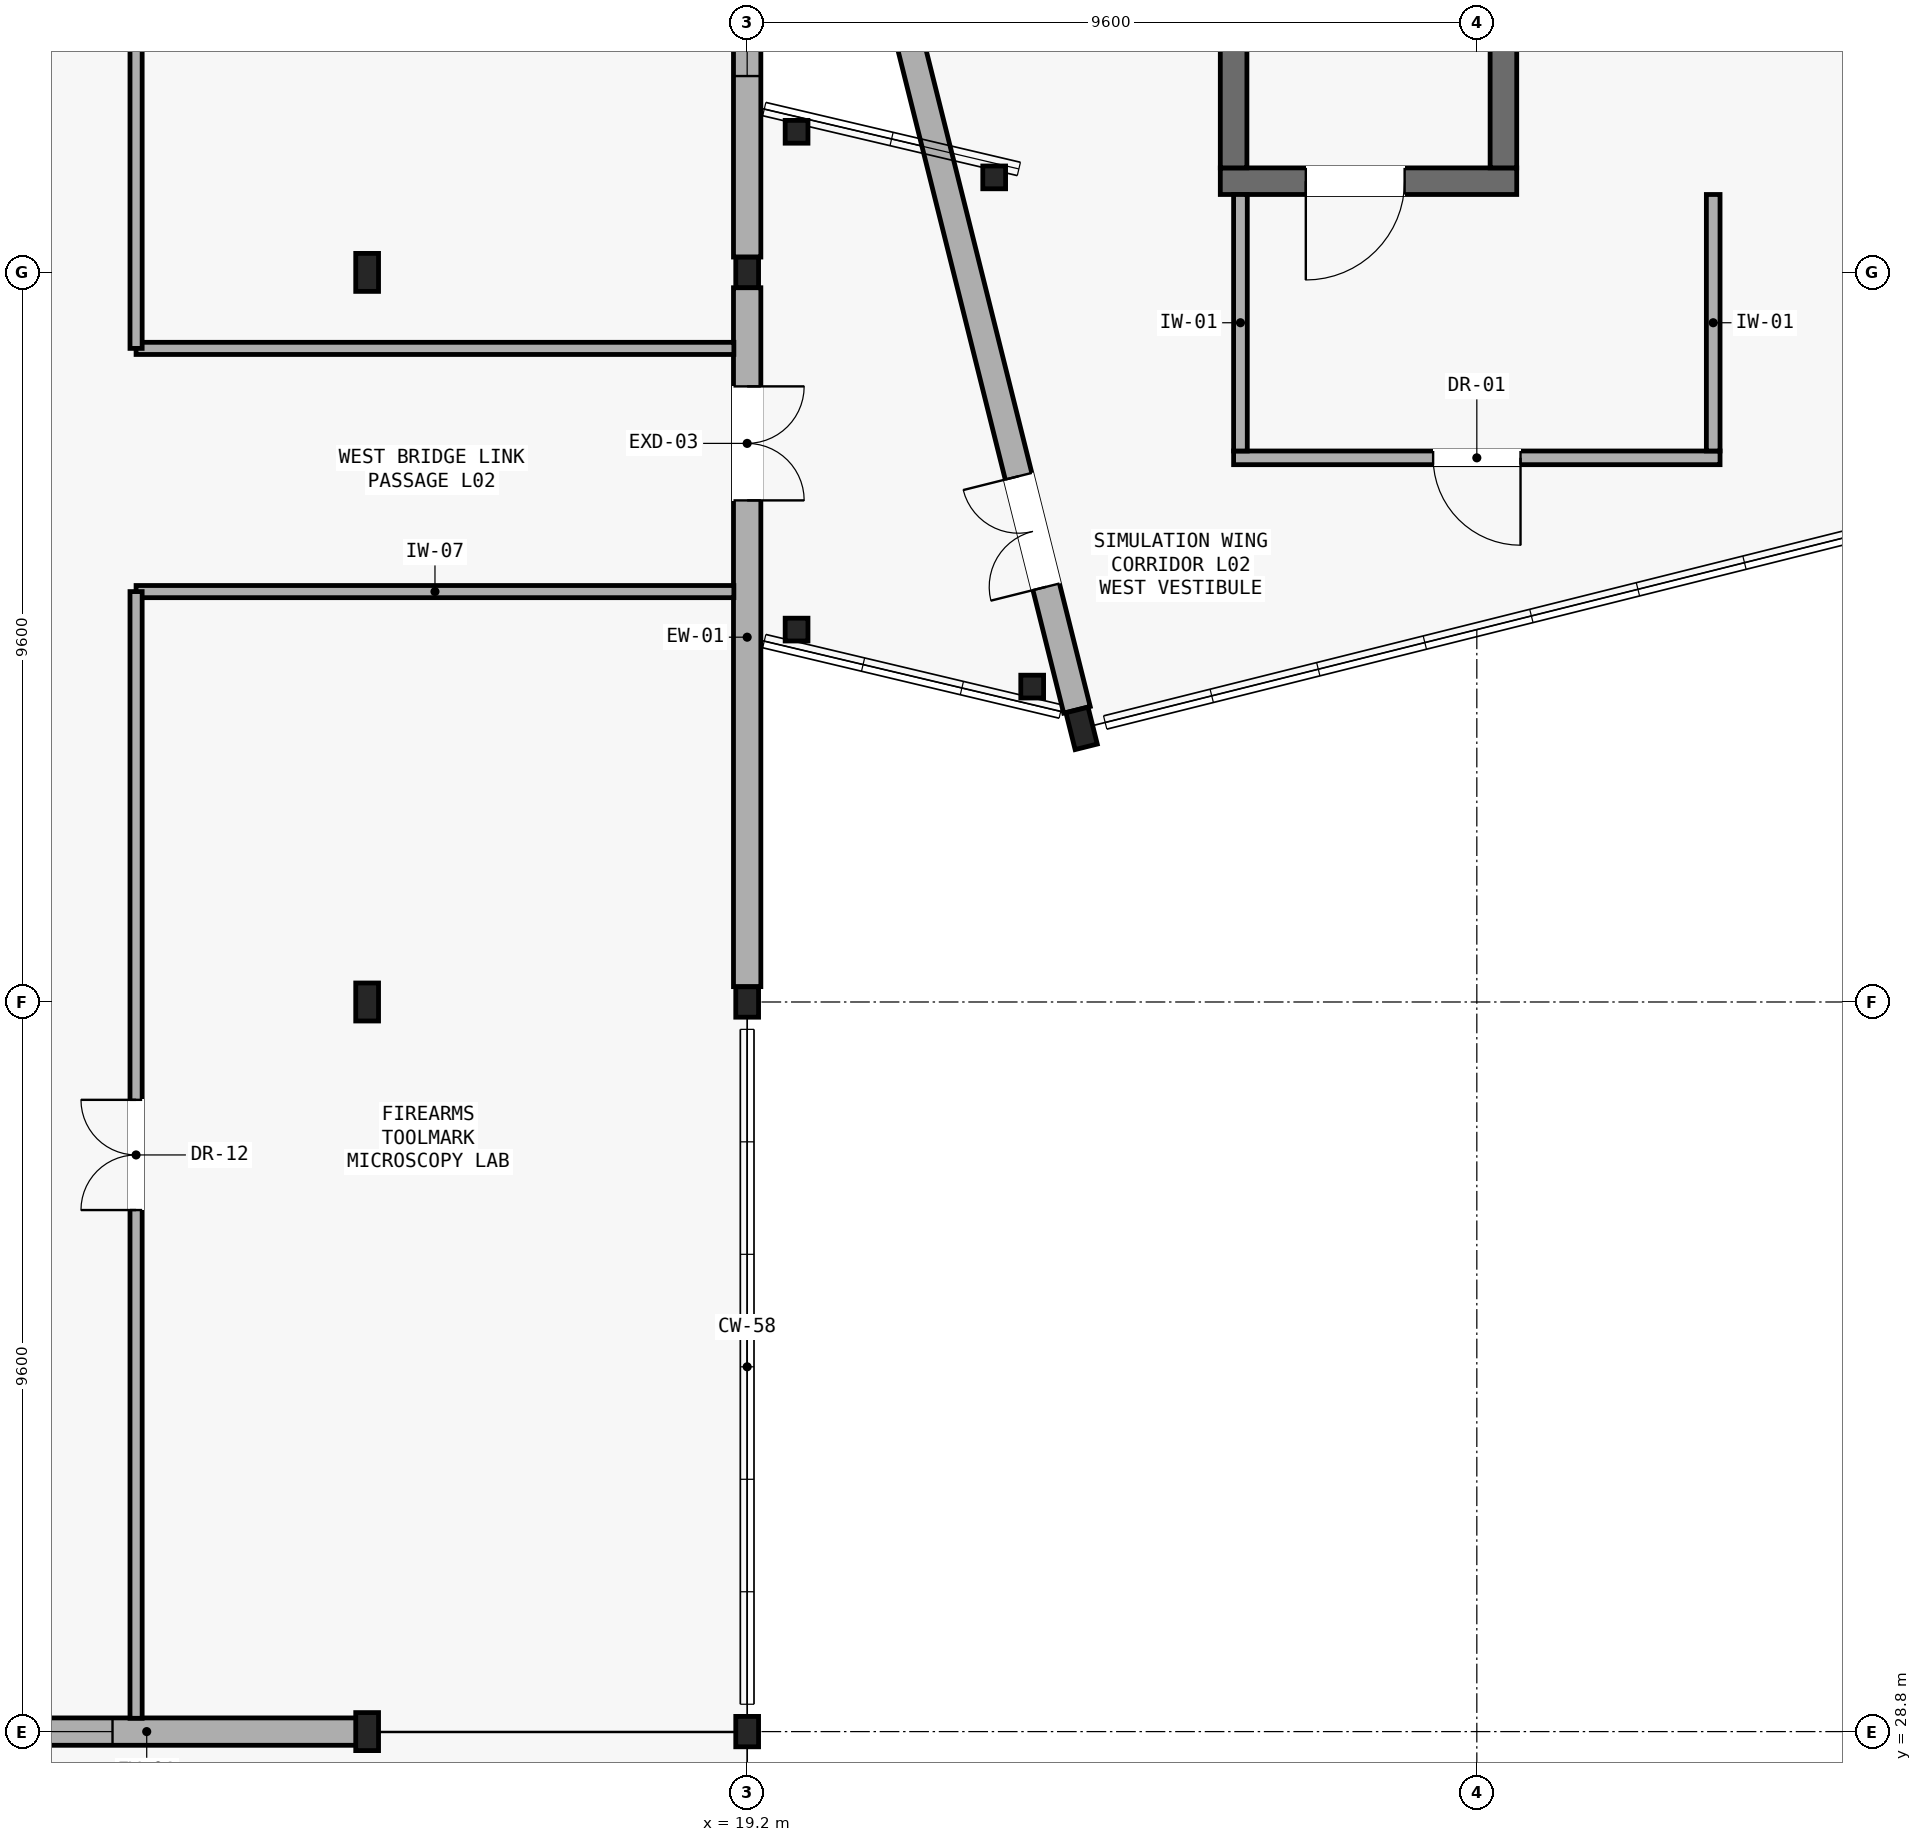
"""IFC4 building model, lengths in metres.
Left out: names, types, materials, properties, quantities, classifications, styles, units other than length and angle.
Written with IfcOpenShell. Run it as: python <this file> out.ifc"""

import sys

from ifc_helpers import new_model, si_unit, direction, frame, frame_2d, origin, origin_2d, place, context, subcontext, project, spatial, rectangle, i_section, extrude, element, fill, save


model = new_model("IFC4")
c1 = context("Model", 3, precision=1e-05, world=origin(), true_north=direction((0.0, 1.0)))
c2 = subcontext(c1, "Body", "Model", "MODEL_VIEW")
j1 = project(units=[si_unit("LENGTHUNIT", "METRE"), si_unit("PLANEANGLEUNIT", "RADIAN")], contexts=[c1])
p1 = place(None, origin())
s1 = spatial("IfcSite", under=j1, at=p1, CompositionType="ELEMENT")
p2 = place(p1, origin())
s2 = spatial("IfcBuilding", under=s1, at=p2, CompositionType="ELEMENT")
p3 = place(p2, frame((0.0, 0.0, 9.45)))
s3 = spatial("IfcBuildingStorey", under=s2, at=p3, CompositionType="ELEMENT", Elevation=9.45)
for number, where, z_axis, x_axis in (
    (1, (19.85, 49.85, 0.0), (0.0, 0.0, 1.0), (1.0, 0.0, 0.0)),
    (2, (19.85, 43.3, 0.0), (0.0, 0.0, 1.0), (1.0, 0.0, 0.0)),
    (3, (22.45, 49.25, 0.0), (0.0, 0.0, 1.0), (1.0, 0.0, 0.0)),
    (4, (22.95, 42.55, 0.0), (0.0, 0.0, 1.0), (1.0, 0.0, 0.0)),
):
    element("IfcColumn", number, at=place(p3, frame(where, z_axis=z_axis, x_axis=x_axis)), inside=s3, PredefinedType="COLUMN", context=c2, shape_type="SweptSolid", body=[
        extrude(i_section(OverallWidth=0.3, OverallDepth=0.3, WebThickness=0.011, FlangeThickness=0.019, FilletRadius=0.027, at=origin_2d()), origin(), (0.0, 0.0, 1.0), 4.2),
    ])
p4 = place(p3, frame((19.2, 28.8, 0.0), z_axis=(0.0, 0.0, 1.0), x_axis=(1.0, 0.0, 0.0)))
e5 = element("IfcColumn", 5, at=p4, inside=s3, PredefinedType="COLUMN", context=c2, shape_type="SweptSolid", body=[
    extrude(i_section(OverallWidth=0.3, OverallDepth=0.4, WebThickness=0.013, FlangeThickness=0.024, FilletRadius=0.027, at=origin_2d()), origin(), (0.0, 0.0, 1.0), 4.2),
])
p5 = place(p3, frame((14.2, 28.8, 0.0), z_axis=(0.0, 0.0, 1.0), x_axis=(1.0, 0.0, 0.0)))
e6 = element("IfcColumn", 6, at=p5, inside=s3, PredefinedType="COLUMN", context=c2, shape_type="SweptSolid", body=[
    extrude(i_section(OverallWidth=0.3, OverallDepth=0.5, WebThickness=0.014, FlangeThickness=0.028, FilletRadius=0.027, at=origin_2d()), origin(), (0.0, 0.0, 1.0), 4.2),
])
p6 = place(p3, frame((19.2, 38.4, 0.0), z_axis=(0.0, 0.0, 1.0), x_axis=(1.0, 0.0, 0.0)))
e7 = element("IfcColumn", 7, at=p6, inside=s3, PredefinedType="COLUMN", context=c2, shape_type="SweptSolid", body=[
    extrude(i_section(OverallWidth=0.3, OverallDepth=0.4, WebThickness=0.013, FlangeThickness=0.024, FilletRadius=0.027, at=origin_2d()), origin(), (0.0, 0.0, 1.0), 4.2),
])
p7 = place(p3, frame((14.2, 38.4, 0.0), z_axis=(0.0, 0.0, 1.0), x_axis=(1.0, 0.0, 0.0)))
e8 = element("IfcColumn", 8, at=p7, inside=s3, PredefinedType="COLUMN", context=c2, shape_type="SweptSolid", body=[
    extrude(i_section(OverallWidth=0.3, OverallDepth=0.5, WebThickness=0.014, FlangeThickness=0.028, FilletRadius=0.027, at=origin_2d()), origin(), (0.0, 0.0, 1.0), 4.2),
])
p8 = place(p3, frame((19.2, 48.0, 0.0), z_axis=(0.0, 0.0, 1.0), x_axis=(1.0, 0.0, 0.0)))
e9 = element("IfcColumn", 9, at=p8, inside=s3, PredefinedType="COLUMN", context=c2, shape_type="SweptSolid", body=[
    extrude(i_section(OverallWidth=0.3, OverallDepth=0.4, WebThickness=0.013, FlangeThickness=0.024, FilletRadius=0.027, at=origin_2d()), origin(), (0.0, 0.0, 1.0), 4.2),
])
for number, where, z_axis, x_axis in (
    (10, (14.2, 48.0, 0.0), (0.0, 0.0, 1.0), (1.0, 0.0, 0.0)),
    (11, (23.6, 42.0, 0.0), (0.0, 0.0, 1.0), (0.97, 0.243, 0.0)),
):
    element("IfcColumn", number, at=place(p3, frame(where, z_axis=z_axis, x_axis=x_axis)), inside=s3, PredefinedType="COLUMN", context=c2, shape_type="SweptSolid", body=[
        extrude(i_section(OverallWidth=0.3, OverallDepth=0.5, WebThickness=0.014, FlangeThickness=0.028, FilletRadius=0.027, at=origin_2d()), origin(), (0.0, 0.0, 1.0), 4.2),
    ])
p9 = place(p3, frame((19.2, 38.602, 0.0), z_axis=(0.0, 0.0, 1.0), x_axis=(0.0, 1.0, 0.0)))
e12 = element("IfcWall", 12, at=p9, inside=s3, PredefinedType="SOLIDWALL", context=c2, shape_type="SweptSolid", body=[
    extrude(rectangle(XDim=9.196, YDim=0.36, at=frame_2d((4.598, 0.0))), origin(), (0.0, 0.0, 1.0), 3.51),
])
p10 = place(p9, frame((6.398, 0.0, 0.0)))
e13 = element("IfcOpeningElement", 13, at=p10, cuts=e12, PredefinedType="OPENING", context=c2, shape_type="SweptSolid", body=[
    extrude(rectangle(XDim=1.5, YDim=2.2, at=frame_2d((0.75, 1.1))), frame((0.0, 0.19, 0.0), z_axis=(0.0, -1.0, 0.0), x_axis=(1.0, 0.0, 0.0)), (0.0, 0.0, 1.0), 0.38),
])
p11 = place(p3, frame((19.2, 48.202, 0.0), z_axis=(0.0, 0.0, 1.0), x_axis=(0.0, 1.0, 0.0)))
e14 = element("IfcWall", 14, at=p11, inside=s3, PredefinedType="SOLIDWALL", context=c2, shape_type="SweptSolid", body=[
    extrude(rectangle(XDim=9.196, YDim=0.36, at=frame_2d((4.598, 0.0))), origin(), (0.0, 0.0, 1.0), 3.51),
])
p12 = place(p11, frame((2.381, 0.0, 0.9)))
e15 = element("IfcOpeningElement", 15, at=p12, cuts=e14, PredefinedType="OPENING", context=c2, shape_type="SweptSolid", body=[
    extrude(rectangle(XDim=1.5, YDim=1.55, at=frame_2d((0.75, 0.775))), frame((0.0, 0.19, 0.0), z_axis=(0.0, -1.0, 0.0), x_axis=(1.0, 0.0, 0.0)), (0.0, 0.0, 1.0), 0.38),
])
p13 = place(p11, frame((5.315, 0.0, 0.9)))
e16 = element("IfcOpeningElement", 16, at=p13, cuts=e14, PredefinedType="OPENING", context=c2, shape_type="SweptSolid", body=[
    extrude(rectangle(XDim=1.5, YDim=1.55, at=frame_2d((0.75, 0.775))), frame((0.0, 0.19, 0.0), z_axis=(0.0, -1.0, 0.0), x_axis=(1.0, 0.0, 0.0)), (0.0, 0.0, 1.0), 0.38),
])
p14 = place(p3, frame((8.409, 28.8, 0.0), z_axis=(0.0, 0.0, 1.0), x_axis=(1.0, 0.0, 0.0)))
e17 = element("IfcWall", 17, at=p14, inside=s3, PredefinedType="SOLIDWALL", context=c2, shape_type="SweptSolid", body=[
    extrude(rectangle(XDim=5.781, YDim=0.36, at=frame_2d((2.891, 0.0))), origin(), (0.0, 0.0, 1.0), 3.64),
])
p15 = place(p14, frame((1.241, 0.0, 0.9)))
e18 = element("IfcOpeningElement", 18, at=p15, cuts=e17, PredefinedType="OPENING", context=c2, shape_type="SweptSolid", body=[
    extrude(rectangle(XDim=1.2, YDim=1.15, at=frame_2d((0.6, 0.575))), frame((0.0, 0.19, 0.0), z_axis=(0.0, -1.0, 0.0), x_axis=(1.0, 0.0, 0.0)), (0.0, 0.0, 1.0), 0.38),
])
p16 = place(p3, frame((23.539, 42.244, 0.0), z_axis=(0.0, 0.0, 1.0), x_axis=(-0.242523223331, 0.970145600487, 0.0)))
e19 = element("IfcWall", 19, at=p16, inside=s3, PredefinedType="SOLIDWALL", context=c2, shape_type="SweptSolid", body=[
    extrude(rectangle(XDim=13.896, YDim=0.36, at=frame_2d((6.948, 0.0))), origin(), (0.0, 0.0, 1.0), 3.41),
])
p17 = place(p16, frame((1.668, 0.0, 0.0)))
e20 = element("IfcOpeningElement", 20, at=p17, cuts=e19, PredefinedType="OPENING", context=c2, shape_type="SweptSolid", body=[
    extrude(rectangle(XDim=1.5, YDim=2.2, at=frame_2d((0.75, 1.1))), frame((0.0, 0.19, 0.0), z_axis=(0.0, -1.0, 0.0), x_axis=(1.0, 0.0, 0.0)), (0.0, 0.0, 1.0), 0.38),
])
p18 = place(p3, frame((25.425, 49.2, 0.0), z_axis=(0.0, 0.0, 1.0), x_axis=(1.0, 0.0, 0.0)))
e21 = element("IfcWall", 21, at=p18, inside=s3, PredefinedType="SHEAR", context=c2, shape_type="SweptSolid", body=[
    extrude(rectangle(XDim=3.9, YDim=0.35, at=frame_2d((1.95, 0.0))), origin(), (0.0, 0.0, 1.0), 3.97),
])
p19 = place(p18, frame((1.125, 0.0, 0.0)))
e22 = element("IfcOpeningElement", 22, at=p19, cuts=e21, PredefinedType="OPENING", context=c2, shape_type="SweptSolid", body=[
    extrude(rectangle(XDim=1.3, YDim=2.15, at=frame_2d((0.65, 1.075))), frame((0.0, 0.185, 0.0), z_axis=(0.0, -1.0, 0.0), x_axis=(1.0, 0.0, 0.0)), (0.0, 0.0, 1.0), 0.37),
])
for number, where, z_axis, x_axis in (
    (23, (25.6, 49.375, 0.0), (0.0, 0.0, 1.0), (0.0, 1.0, 0.0)),
    (24, (29.15, 49.375, 0.0), (0.0, 0.0, 1.0), (0.0, 1.0, 0.0)),
):
    element("IfcWall", number, at=place(p3, frame(where, z_axis=z_axis, x_axis=x_axis)), inside=s3, PredefinedType="SHEAR", context=c2, shape_type="SweptSolid", body=[
        extrude(rectangle(XDim=7.6, YDim=0.35, at=frame_2d((3.8, 0.0))), origin(), (0.0, 0.0, 1.0), 3.97),
    ])
p20 = place(p3, frame((25.6, 45.56, 0.0), z_axis=(0.0, 0.0, 1.0), x_axis=(1.0, 0.0, 0.0)))
e25 = element("IfcWall", 25, at=p20, inside=s3, PredefinedType="PARTITIONING", context=c2, shape_type="SweptSolid", body=[
    extrude(rectangle(XDim=6.4, YDim=0.18, at=frame_2d((3.2, 0.0))), origin(), (0.0, 0.0, 1.0), 3.59),
])
p21 = place(p20, frame((2.625, 0.0, 0.0)))
e26 = element("IfcOpeningElement", 26, at=p21, cuts=e25, PredefinedType="OPENING", context=c2, shape_type="SweptSolid", body=[
    extrude(rectangle(XDim=1.15, YDim=2.15, at=frame_2d((0.575, 1.075))), frame((0.0, 0.1, 0.0), z_axis=(0.0, -1.0, 0.0), x_axis=(1.0, 0.0, 0.0)), (0.0, 0.0, 1.0), 0.2),
])
for number, where, z_axis, x_axis in (
    (27, (25.69, 45.65, 0.0), (0.0, 0.0, 1.0), (0.0, 1.0, 0.0)),
    (28, (31.91, 45.65, 0.0), (0.0, 0.0, 1.0), (0.0, 1.0, 0.0)),
):
    element("IfcWall", number, at=place(p3, frame(where, z_axis=z_axis, x_axis=x_axis)), inside=s3, PredefinedType="PARTITIONING", context=c2, shape_type="SweptSolid", body=[
        extrude(rectangle(XDim=3.375, YDim=0.18, at=frame_2d((1.688, 0.0))), origin(), (0.0, 0.0, 1.0), 3.97),
    ])
p22 = place(p3, frame((19.025, 43.8, 0.0), z_axis=(0.0, 0.0, 1.0), x_axis=(-1.0, 0.0, 0.0)))
e29 = element("IfcWall", 29, at=p22, inside=s3, PredefinedType="PARTITIONING", context=c2, shape_type="SweptSolid", body=[
    extrude(rectangle(XDim=7.865, YDim=0.16, at=frame_2d((3.933, 0.0))), origin(), (0.0, 0.0, 1.0), 3.97),
])
p23 = place(p3, frame((11.16, 43.8, 0.0), z_axis=(0.0, 0.0, 1.0), x_axis=(0.0, -1.0, 0.0)))
e30 = element("IfcWall", 30, at=p23, inside=s3, PredefinedType="PARTITIONING", context=c2, shape_type="SweptSolid", body=[
    extrude(rectangle(XDim=14.825, YDim=0.16, at=frame_2d((7.413, 0.0))), origin(), (0.0, 0.0, 1.0), 3.59),
])
p24 = place(p23, frame((6.688, 0.0, 0.0)))
e31 = element("IfcOpeningElement", 31, at=p24, cuts=e30, PredefinedType="OPENING", context=c2, shape_type="SweptSolid", body=[
    extrude(rectangle(XDim=1.45, YDim=2.15, at=frame_2d((0.725, 1.075))), frame((0.0, 0.09, 0.0), z_axis=(0.0, -1.0, 0.0), x_axis=(1.0, 0.0, 0.0)), (0.0, 0.0, 1.0), 0.18),
])
p25 = place(p3, frame((11.16, 47.0, 0.0), z_axis=(0.0, 0.0, 1.0), x_axis=(1.0, 0.0, 0.0)))
e32 = element("IfcWall", 32, at=p25, inside=s3, PredefinedType="PARTITIONING", context=c2, shape_type="SweptSolid", body=[
    extrude(rectangle(XDim=7.865, YDim=0.16, at=frame_2d((3.933, 0.0))), origin(), (0.0, 0.0, 1.0), 3.97),
])
p26 = place(p3, frame((11.16, 82.6, 0.0), z_axis=(0.0, 0.0, 1.0), x_axis=(0.0, -1.0, 0.0)))
e33 = element("IfcWall", 33, at=p26, inside=s3, PredefinedType="PARTITIONING", context=c2, shape_type="SweptSolid", body=[
    extrude(rectangle(XDim=35.6, YDim=0.16, at=frame_2d((17.8, 0.0))), origin(), (0.0, 0.0, 1.0), 3.59),
])
p27 = place(p26, frame((17.075, 0.0, 0.0)))
e34 = element("IfcOpeningElement", 34, at=p27, cuts=e33, PredefinedType="OPENING", context=c2, shape_type="SweptSolid", body=[
    extrude(rectangle(XDim=1.45, YDim=2.15, at=frame_2d((0.725, 1.075))), frame((0.0, 0.09, 0.0), z_axis=(0.0, -1.0, 0.0), x_axis=(1.0, 0.0, 0.0)), (0.0, 0.0, 1.0), 0.18),
])
p28 = place(p3, frame((32.74, 59.041, 0.0), z_axis=(0.0, 0.0, 1.0), x_axis=(0.242525471141, -0.970145038563, 0.0)))
e35 = element("IfcWall", 35, at=p28, inside=s3, PredefinedType="PARTITIONING", context=c2, shape_type="SweptSolid", body=[
    extrude(rectangle(XDim=11.315, YDim=0.12, at=frame_2d((5.657, 0.0))), origin(), (0.0, 0.0, 1.0), 3.97),
])
p29 = place(p10, frame((1.5, 0.0, 0.0), z_axis=(0.0, 0.0, 1.0), x_axis=(-1.0, 0.0, 0.0)))
e36 = element("IfcDoor", 36, at=p29, inside=s3, OperationType="SINGLE_SWING_LEFT", PredefinedType="DOOR", context=c2, shape_type="SweptSolid", body=[
    extrude(rectangle(XDim=1.5, YDim=2.2, at=frame_2d((0.75, 1.1))), frame((0.0, 0.025, 0.0), z_axis=(0.0, -1.0, 0.0), x_axis=(1.0, 0.0, 0.0)), (0.0, 0.0, 1.0), 0.05),
])
fill(e13, e36)
p30 = place(p12, origin())
e37 = element("IfcWindow", 37, at=p30, inside=s3, PartitioningType="SINGLE_PANEL", PredefinedType="WINDOW", context=c2, shape_type="SweptSolid", body=[
    extrude(rectangle(XDim=1.5, YDim=1.55, at=frame_2d((0.75, 0.775))), frame((0.0, 0.03, 0.0), z_axis=(0.0, -1.0, 0.0), x_axis=(1.0, 0.0, 0.0)), (0.0, 0.0, 1.0), 0.06),
])
fill(e15, e37)
p31 = place(p15, origin())
e38 = element("IfcWindow", 38, at=p31, inside=s3, PartitioningType="SINGLE_PANEL", PredefinedType="WINDOW", context=c2, shape_type="SweptSolid", body=[
    extrude(rectangle(XDim=1.2, YDim=1.15, at=frame_2d((0.6, 0.575))), frame((0.0, 0.03, 0.0), z_axis=(0.0, -1.0, 0.0), x_axis=(1.0, 0.0, 0.0)), (0.0, 0.0, 1.0), 0.06),
])
fill(e18, e38)
p32 = place(p17, origin())
e39 = element("IfcDoor", 39, at=p32, inside=s3, OperationType="SINGLE_SWING_LEFT", PredefinedType="DOOR", context=c2, shape_type="SweptSolid", body=[
    extrude(rectangle(XDim=1.5, YDim=2.2, at=frame_2d((0.75, 1.1))), frame((0.0, 0.025, 0.0), z_axis=(0.0, -1.0, 0.0), x_axis=(1.0, 0.0, 0.0)), (0.0, 0.0, 1.0), 0.05),
])
fill(e20, e39)
p33 = place(p19, frame((1.3, 0.0, 0.0), z_axis=(0.0, 0.0, 1.0), x_axis=(-1.0, 0.0, 0.0)))
e40 = element("IfcDoor", 40, at=p33, inside=s3, OperationType="SINGLE_SWING_LEFT", PredefinedType="DOOR", context=c2, shape_type="SweptSolid", body=[
    extrude(rectangle(XDim=1.3, YDim=2.15, at=frame_2d((0.65, 1.075))), frame((0.0, 0.025, 0.0), z_axis=(0.0, -1.0, 0.0), x_axis=(1.0, 0.0, 0.0)), (0.0, 0.0, 1.0), 0.05),
])
fill(e22, e40)
p34 = place(p21, frame((1.15, 0.0, 0.0), z_axis=(0.0, 0.0, 1.0), x_axis=(-1.0, 0.0, 0.0)))
e41 = element("IfcDoor", 41, at=p34, inside=s3, OperationType="SINGLE_SWING_RIGHT", PredefinedType="DOOR", context=c2, shape_type="SweptSolid", body=[
    extrude(rectangle(XDim=1.15, YDim=2.15, at=frame_2d((0.575, 1.075))), frame((0.0, 0.025, 0.0), z_axis=(0.0, -1.0, 0.0), x_axis=(1.0, 0.0, 0.0)), (0.0, 0.0, 1.0), 0.05),
])
fill(e26, e41)
p35 = place(p24, frame((1.45, 0.0, 0.0), z_axis=(0.0, 0.0, 1.0), x_axis=(-1.0, 0.0, 0.0)))
e42 = element("IfcDoor", 42, at=p35, inside=s3, OperationType="DOUBLE_DOOR_SINGLE_SWING", PredefinedType="DOOR", context=c2, shape_type="SweptSolid", body=[
    extrude(rectangle(XDim=1.45, YDim=2.15, at=frame_2d((0.725, 1.075))), frame((0.0, 0.025, 0.0), z_axis=(0.0, -1.0, 0.0), x_axis=(1.0, 0.0, 0.0)), (0.0, 0.0, 1.0), 0.05),
])
fill(e31, e42)
save(model, sys.argv[1])
